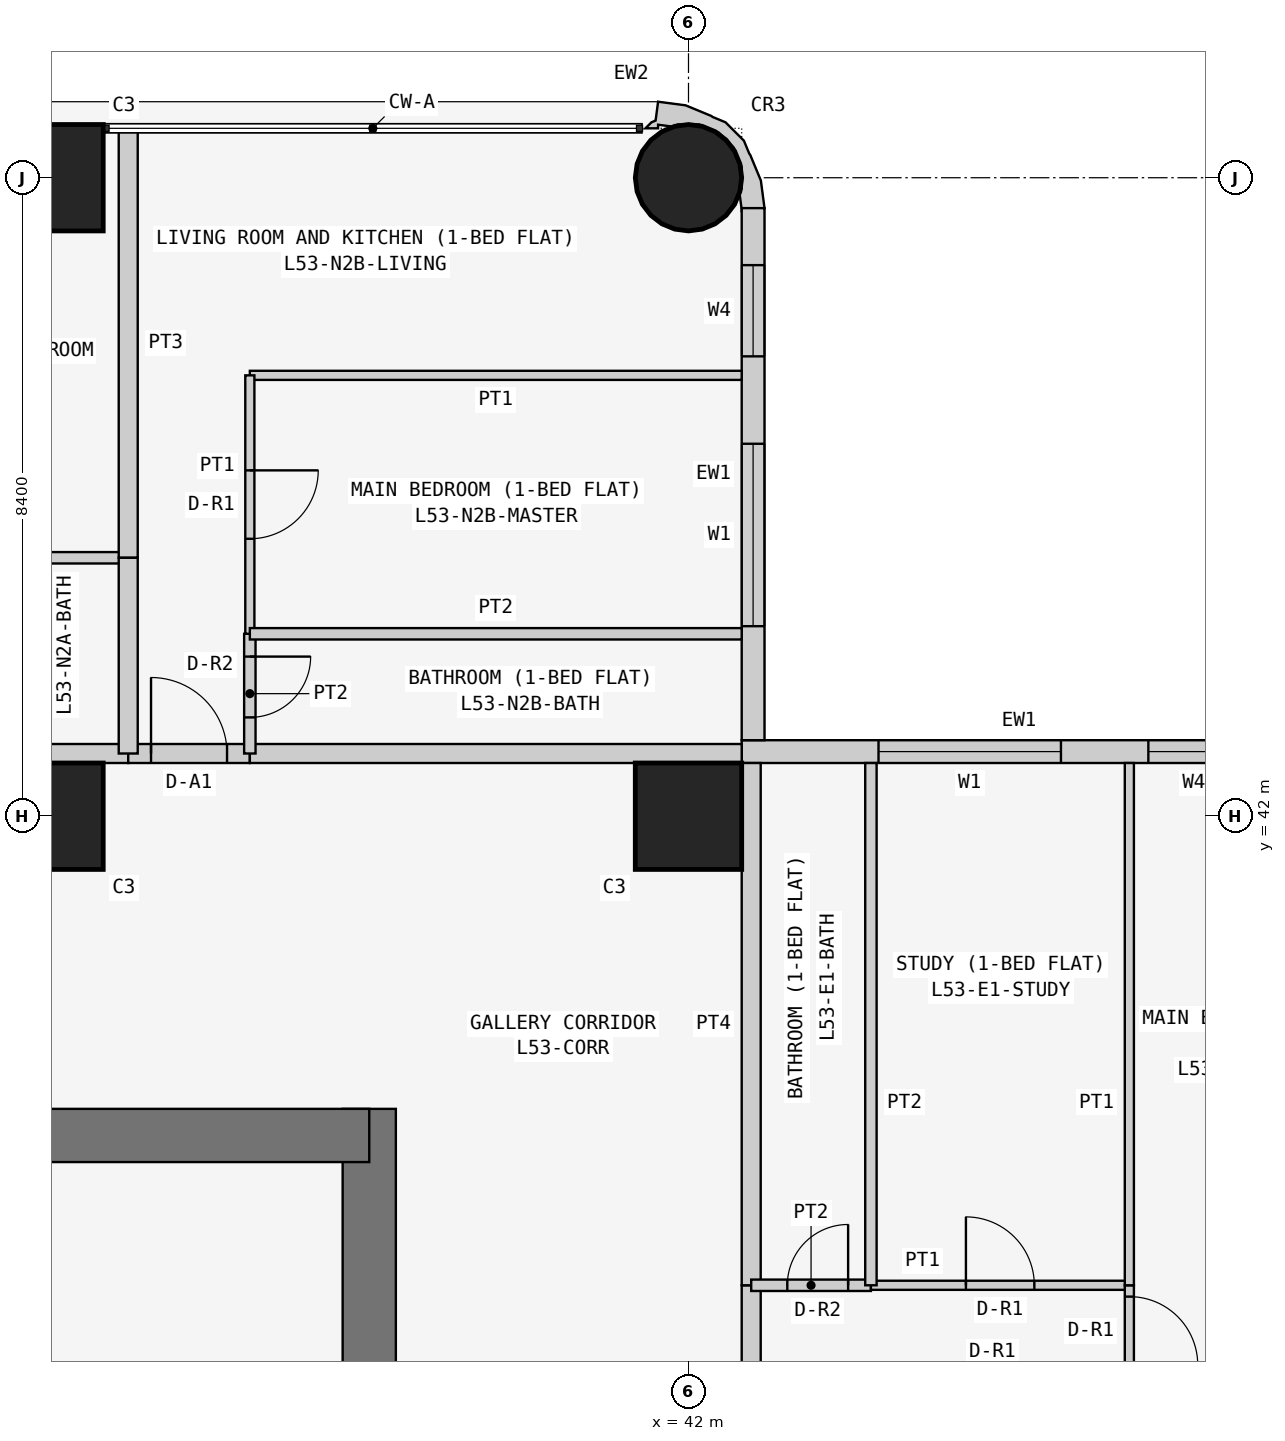
"""IFC4 building model, lengths in metres.
Left out: names, types, materials, properties, quantities, classifications, styles, units other than length and angle.
Written with IfcOpenShell. Run it as: python <this file> out.ifc"""

import sys

from ifc_helpers import new_model, si_unit, direction, frame, frame_2d, origin, origin_2d, place, context, subcontext, project, spatial, polyline, rectangle, circle, outline, extrude, element, fill, save


model = new_model("IFC4")
c1 = context("Model", 3, precision=1e-05, world=origin(), true_north=direction((0.0, 1.0)))
c2 = subcontext(c1, "Body", "Model", "MODEL_VIEW")
j1 = project(units=[si_unit("LENGTHUNIT", "METRE"), si_unit("PLANEANGLEUNIT", "RADIAN")], contexts=[c1])
p1 = place(None, origin())
s1 = spatial("IfcSite", under=j1, at=p1, CompositionType="ELEMENT")
p2 = place(p1, origin())
s2 = spatial("IfcBuilding", under=s1, at=p2, CompositionType="ELEMENT")
p3 = place(p2, frame((0.0, 0.0, 204.9)))
s3 = spatial("IfcBuildingStorey", under=s2, at=p3, CompositionType="ELEMENT", Elevation=204.9)
for number, where, z_axis, x_axis in (
    (1, (33.6, 42.0, 0.0), (0.0, 0.0, 1.0), (1.0, 0.0, 0.0)),
    (2, (33.6, 50.4, 0.0), (0.0, 0.0, 1.0), (1.0, 0.0, 0.0)),
    (3, (42.0, 42.0, 0.0), (0.0, 0.0, 1.0), (1.0, 0.0, 0.0)),
):
    element("IfcColumn", number, at=place(p3, frame(where, z_axis=z_axis, x_axis=x_axis)), inside=s3, PredefinedType="COLUMN", context=c2, shape_type="SweptSolid", body=[
        extrude(rectangle(XDim=1.4, YDim=1.4, at=origin_2d()), origin(), (0.0, 0.0, 1.0), 3.6),
    ])
p4 = place(p3, frame((42.0, 50.4, 0.0), z_axis=(0.0, 0.0, 1.0), x_axis=(1.0, 0.0, 0.0)))
e4 = element("IfcColumn", 4, at=p4, inside=s3, PredefinedType="COLUMN", context=c2, shape_type="SweptSolid", body=[
    extrude(circle(Radius=0.7, at=origin_2d()), origin(), (0.0, 0.0, 1.0), 3.6),
])
p5 = place(p3, frame((37.8, 21.0, 0.0), z_axis=(0.0, 0.0, 1.0), x_axis=(0.0, 1.0, 0.0)))
e5 = element("IfcWall", 5, at=p5, inside=s3, PredefinedType="SHEAR", context=c2, shape_type="SweptSolid", body=[
    extrude(rectangle(XDim=17.15, YDim=0.7, at=frame_2d((8.575, 0.0))), origin(), (0.0, 0.0, 1.0), 3.6),
])
p6 = place(p5, frame((5.2, 0.0, 0.0)))
e6 = element("IfcOpeningElement", 6, at=p6, cuts=e5, PredefinedType="OPENING", context=c2, shape_type="SweptSolid", body=[
    extrude(rectangle(XDim=1.2, YDim=2.1, at=frame_2d((0.6, 1.05))), frame((0.0, 0.36, 0.0), z_axis=(0.0, -1.0, 0.0), x_axis=(1.0, 0.0, 0.0)), (0.0, 0.0, 1.0), 0.72),
])
p7 = place(p3, frame((37.8, 37.8, 0.0), z_axis=(0.0, 0.0, 1.0), x_axis=(-1.0, 0.0, 0.0)))
e7 = element("IfcWall", 7, at=p7, inside=s3, PredefinedType="SHEAR", context=c2, shape_type="SweptSolid", body=[
    extrude(rectangle(XDim=17.15, YDim=0.7, at=frame_2d((8.575, 0.0))), origin(), (0.0, 0.0, 1.0), 3.6),
])
p8 = place(p3, frame((50.0, 42.85, 0.0), z_axis=(0.0, 0.0, 1.0), x_axis=(-1.0, 0.0, 0.0)))
e8 = element("IfcWall", 8, at=p8, inside=s3, PredefinedType="SOLIDWALL", context=c2, shape_type="SweptSolid", body=[
    extrude(rectangle(XDim=7.3, YDim=0.3, at=frame_2d((3.65, 0.0))), origin(), (0.0, 0.0, 1.0), 3.45),
])
p9 = place(p8, frame((3.1, 0.0, 0.9)))
e9 = element("IfcOpeningElement", 9, at=p9, cuts=e8, PredefinedType="OPENING", context=c2, shape_type="SweptSolid", body=[
    extrude(rectangle(XDim=2.4, YDim=1.5, at=frame_2d((1.2, 0.75))), frame((0.0, 0.16, 0.0), z_axis=(0.0, -1.0, 0.0), x_axis=(1.0, 0.0, 0.0)), (0.0, 0.0, 1.0), 0.32),
])
p10 = place(p8, frame((0.75, 0.0, 0.9)))
e10 = element("IfcOpeningElement", 10, at=p10, cuts=e8, PredefinedType="OPENING", context=c2, shape_type="SweptSolid", body=[
    extrude(rectangle(XDim=1.2, YDim=1.5, at=frame_2d((0.6, 0.75))), frame((0.0, 0.16, 0.0), z_axis=(0.0, -1.0, 0.0), x_axis=(1.0, 0.0, 0.0)), (0.0, 0.0, 1.0), 0.32),
])
p11 = place(p3, frame((42.85, 43.0, 0.0), z_axis=(0.0, 0.0, 1.0), x_axis=(0.0, 1.0, 0.0)))
e11 = element("IfcWall", 11, at=p11, inside=s3, PredefinedType="SOLIDWALL", context=c2, shape_type="SweptSolid", body=[
    extrude(rectangle(XDim=7.0, YDim=0.3, at=frame_2d((3.5, 0.0))), origin(), (0.0, 0.0, 1.0), 3.45),
])
p12 = place(p11, frame((1.5, 0.0, 0.9)))
e12 = element("IfcOpeningElement", 12, at=p12, cuts=e11, PredefinedType="OPENING", context=c2, shape_type="SweptSolid", body=[
    extrude(rectangle(XDim=2.4, YDim=1.5, at=frame_2d((1.2, 0.75))), frame((0.0, 0.16, 0.0), z_axis=(0.0, -1.0, 0.0), x_axis=(1.0, 0.0, 0.0)), (0.0, 0.0, 1.0), 0.32),
])
p13 = place(p11, frame((5.05, 0.0, 0.9)))
e13 = element("IfcOpeningElement", 13, at=p13, cuts=e11, PredefinedType="OPENING", context=c2, shape_type="SweptSolid", body=[
    extrude(rectangle(XDim=1.2, YDim=1.5, at=frame_2d((0.6, 0.75))), frame((0.0, 0.16, 0.0), z_axis=(0.0, -1.0, 0.0), x_axis=(1.0, 0.0, 0.0)), (0.0, 0.0, 1.0), 0.32),
])
p14 = place(p3, frame((42.724, 50.11, 0.0), z_axis=(0.0, 0.0, 1.0), x_axis=(0.439933741929, 0.898030234854, 0.0)))
e14 = element("IfcWall", 14, at=p14, inside=s3, PredefinedType="SOLIDWALL", context=c2, shape_type="SweptSolid", body=[
    extrude(outline(polyline([(-0.145, -0.044), (0.022, -0.296), (0.327, -0.094), (0.568, 0.18), (0.577, 0.199), (0.7, 0.337), (0.811, 0.661), (0.799, 0.845), (0.803, 0.866), (0.78, 1.231), (0.664, 1.577), (0.426, 1.497), (0.382, 1.536), (0.276, 1.572), (0.349, 1.423), (0.392, 1.444), (0.453, 1.261), (0.51, 1.211), (0.632, 0.961), (0.65, 0.683), (0.56, 0.419), (0.375, 0.21), (0.125, 0.087), (0.05, 0.082), (-0.127, -0.035), (-0.145, -0.044)])), origin(), (0.0, 0.0, 1.0), 3.45),
])
p15 = place(p3, frame((32.0, 42.825, 0.0), z_axis=(0.0, 0.0, 1.0), x_axis=(1.0, 0.0, 0.0)))
e15 = element("IfcWall", 15, at=p15, inside=s3, PredefinedType="PARTITIONING", context=c2, shape_type="SweptSolid", body=[
    extrude(rectangle(XDim=2.629, YDim=0.25, at=frame_2d((1.314, 0.0))), origin(), (0.0, 0.0, 1.0), 3.45),
])
p16 = place(p3, frame((34.629, 42.825, 0.0), z_axis=(0.0, 0.0, 1.0), x_axis=(1.0, 0.0, 0.0)))
e16 = element("IfcWall", 16, at=p16, inside=s3, PredefinedType="PARTITIONING", context=c2, shape_type="SweptSolid", body=[
    extrude(rectangle(XDim=1.6, YDim=0.25, at=frame_2d((0.8, 0.0))), origin(), (0.0, 0.0, 1.0), 3.45),
])
p17 = place(p16, frame((0.3, 0.0, 0.0)))
e17 = element("IfcOpeningElement", 17, at=p17, cuts=e16, PredefinedType="OPENING", context=c2, shape_type="SweptSolid", body=[
    extrude(rectangle(XDim=1.0, YDim=2.1, at=frame_2d((0.5, 1.05))), frame((0.0, 0.135, 0.0), z_axis=(0.0, -1.0, 0.0), x_axis=(1.0, 0.0, 0.0)), (0.0, 0.0, 1.0), 0.27),
])
p18 = place(p3, frame((36.229, 42.825, 0.0), z_axis=(0.0, 0.0, 1.0), x_axis=(1.0, 0.0, 0.0)))
e18 = element("IfcWall", 18, at=p18, inside=s3, PredefinedType="PARTITIONING", context=c2, shape_type="SweptSolid", body=[
    extrude(rectangle(XDim=6.471, YDim=0.25, at=frame_2d((3.235, 0.0))), origin(), (0.0, 0.0, 1.0), 3.45),
])
p19 = place(p3, frame((42.825, 35.829, 0.0), z_axis=(0.0, 0.0, 1.0), x_axis=(0.0, -1.0, 0.0)))
e19 = element("IfcWall", 19, at=p19, inside=s3, PredefinedType="PARTITIONING", context=c2, shape_type="SweptSolid", body=[
    extrude(rectangle(XDim=6.429, YDim=0.25, at=frame_2d((3.215, 0.0))), origin(), (0.0, 0.0, 1.0), 3.45),
])
p20 = place(p19, frame((4.929, 0.0, 0.0)))
e20 = element("IfcOpeningElement", 20, at=p20, cuts=e19, PredefinedType="OPENING", context=c2, shape_type="SweptSolid", body=[
    extrude(rectangle(XDim=1.0, YDim=2.1, at=frame_2d((0.5, 1.05))), frame((0.0, 0.135, 0.0), z_axis=(0.0, -1.0, 0.0), x_axis=(1.0, 0.0, 0.0)), (0.0, 0.0, 1.0), 0.27),
])
p21 = place(p3, frame((42.825, 42.7, 0.0), z_axis=(0.0, 0.0, 1.0), x_axis=(0.0, -1.0, 0.0)))
e21 = element("IfcWall", 21, at=p21, inside=s3, PredefinedType="PARTITIONING", context=c2, shape_type="SweptSolid", body=[
    extrude(rectangle(XDim=6.871, YDim=0.25, at=frame_2d((3.436, 0.0))), origin(), (0.0, 0.0, 1.0), 3.45),
])
p22 = place(p3, frame((34.629, 45.4, 0.0), z_axis=(0.0, 0.0, 1.0), x_axis=(-1.0, 0.0, 0.0)))
e22 = element("IfcWall", 22, at=p22, inside=s3, PredefinedType="PARTITIONING", context=c2, shape_type="SweptSolid", body=[
    extrude(rectangle(XDim=2.629, YDim=0.15, at=frame_2d((1.314, 0.0))), origin(), (0.0, 0.0, 1.0), 3.45),
])
p23 = place(p3, frame((34.629, 51.05, 0.0), z_axis=(0.0, 0.0, 1.0), x_axis=(0.0, -1.0, 0.0)))
e23 = element("IfcWall", 23, at=p23, inside=s3, PredefinedType="PARTITIONING", context=c2, shape_type="SweptSolid", body=[
    extrude(rectangle(XDim=5.65, YDim=0.25, at=frame_2d((2.825, 0.0))), origin(), (0.0, 0.0, 1.0), 3.45),
])
p24 = place(p3, frame((34.629, 45.4, 0.0), z_axis=(0.0, 0.0, 1.0), x_axis=(0.0, -1.0, 0.0)))
e24 = element("IfcWall", 24, at=p24, inside=s3, PredefinedType="PARTITIONING", context=c2, shape_type="SweptSolid", body=[
    extrude(rectangle(XDim=2.575, YDim=0.25, at=frame_2d((1.288, 0.0))), origin(), (0.0, 0.0, 1.0), 3.45),
])
p25 = place(p3, frame((36.229, 44.4, 0.0), z_axis=(0.0, 0.0, 1.0), x_axis=(0.0, -1.0, 0.0)))
e25 = element("IfcWall", 25, at=p25, inside=s3, PredefinedType="PARTITIONING", context=c2, shape_type="SweptSolid", body=[
    extrude(rectangle(XDim=1.575, YDim=0.15, at=frame_2d((0.788, 0.0))), origin(), (0.0, 0.0, 1.0), 3.45),
])
p26 = place(p25, frame((0.3, 0.0, 0.0)))
e26 = element("IfcOpeningElement", 26, at=p26, cuts=e25, PredefinedType="OPENING", context=c2, shape_type="SweptSolid", body=[
    extrude(rectangle(XDim=0.8, YDim=2.1, at=frame_2d((0.4, 1.05))), frame((0.0, 0.085, 0.0), z_axis=(0.0, -1.0, 0.0), x_axis=(1.0, 0.0, 0.0)), (0.0, 0.0, 1.0), 0.17),
])
p27 = place(p3, frame((42.7, 47.8, 0.0), z_axis=(0.0, 0.0, 1.0), x_axis=(-1.0, 0.0, 0.0)))
e27 = element("IfcWall", 27, at=p27, inside=s3, PredefinedType="PARTITIONING", context=c2, shape_type="SweptSolid", body=[
    extrude(rectangle(XDim=6.471, YDim=0.12, at=frame_2d((3.235, 0.0))), origin(), (0.0, 0.0, 1.0), 3.45),
])
p28 = place(p3, frame((36.229, 47.8, 0.0), z_axis=(0.0, 0.0, 1.0), x_axis=(0.0, -1.0, 0.0)))
e28 = element("IfcWall", 28, at=p28, inside=s3, PredefinedType="PARTITIONING", context=c2, shape_type="SweptSolid", body=[
    extrude(rectangle(XDim=3.4, YDim=0.12, at=frame_2d((1.7, 0.0))), origin(), (0.0, 0.0, 1.0), 3.45),
])
p29 = place(p28, frame((1.25, 0.0, 0.0)))
e29 = element("IfcOpeningElement", 29, at=p29, cuts=e28, PredefinedType="OPENING", context=c2, shape_type="SweptSolid", body=[
    extrude(rectangle(XDim=0.9, YDim=2.1, at=frame_2d((0.45, 1.05))), frame((0.0, 0.07, 0.0), z_axis=(0.0, -1.0, 0.0), x_axis=(1.0, 0.0, 0.0)), (0.0, 0.0, 1.0), 0.14),
])
p30 = place(p3, frame((36.229, 44.4, 0.0), z_axis=(0.0, 0.0, 1.0), x_axis=(1.0, 0.0, 0.0)))
e30 = element("IfcWall", 30, at=p30, inside=s3, PredefinedType="PARTITIONING", context=c2, shape_type="SweptSolid", body=[
    extrude(rectangle(XDim=6.471, YDim=0.15, at=frame_2d((3.235, 0.0))), origin(), (0.0, 0.0, 1.0), 3.45),
])
p31 = place(p3, frame((42.825, 35.829, 0.0), z_axis=(0.0, 0.0, 1.0), x_axis=(1.0, 0.0, 0.0)))
e31 = element("IfcWall", 31, at=p31, inside=s3, PredefinedType="PARTITIONING", context=c2, shape_type="SweptSolid", body=[
    extrude(rectangle(XDim=1.575, YDim=0.15, at=frame_2d((0.788, 0.0))), origin(), (0.0, 0.0, 1.0), 3.45),
])
p32 = place(p31, frame((0.475, 0.0, 0.0)))
e32 = element("IfcOpeningElement", 32, at=p32, cuts=e31, PredefinedType="OPENING", context=c2, shape_type="SweptSolid", body=[
    extrude(rectangle(XDim=0.8, YDim=2.1, at=frame_2d((0.4, 1.05))), frame((0.0, 0.085, 0.0), z_axis=(0.0, -1.0, 0.0), x_axis=(1.0, 0.0, 0.0)), (0.0, 0.0, 1.0), 0.17),
])
p33 = place(p3, frame((44.4, 35.829, 0.0), z_axis=(0.0, 0.0, 1.0), x_axis=(1.0, 0.0, 0.0)))
e33 = element("IfcWall", 33, at=p33, inside=s3, PredefinedType="PARTITIONING", context=c2, shape_type="SweptSolid", body=[
    extrude(rectangle(XDim=3.4, YDim=0.12, at=frame_2d((1.7, 0.0))), origin(), (0.0, 0.0, 1.0), 3.45),
])
p34 = place(p33, frame((1.25, 0.0, 0.0)))
e34 = element("IfcOpeningElement", 34, at=p34, cuts=e33, PredefinedType="OPENING", context=c2, shape_type="SweptSolid", body=[
    extrude(rectangle(XDim=0.9, YDim=2.1, at=frame_2d((0.45, 1.05))), frame((0.0, 0.07, 0.0), z_axis=(0.0, -1.0, 0.0), x_axis=(1.0, 0.0, 0.0)), (0.0, 0.0, 1.0), 0.14),
])
p35 = place(p3, frame((47.8, 35.829, 0.0), z_axis=(0.0, 0.0, 1.0), x_axis=(0.0, -1.0, 0.0)))
e35 = element("IfcWall", 35, at=p35, inside=s3, PredefinedType="PARTITIONING", context=c2, shape_type="SweptSolid", body=[
    extrude(rectangle(XDim=1.2, YDim=0.12, at=frame_2d((0.6, 0.0))), origin(), (0.0, 0.0, 1.0), 3.45),
])
p36 = place(p35, frame((0.149, 0.0, 0.0)))
e36 = element("IfcOpeningElement", 36, at=p36, cuts=e35, PredefinedType="OPENING", context=c2, shape_type="SweptSolid", body=[
    extrude(rectangle(XDim=0.9, YDim=2.1, at=frame_2d((0.45, 1.05))), frame((0.0, 0.07, 0.0), z_axis=(0.0, -1.0, 0.0), x_axis=(1.0, 0.0, 0.0)), (0.0, 0.0, 1.0), 0.14),
])
p37 = place(p3, frame((44.4, 35.829, 0.0), z_axis=(0.0, 0.0, 1.0), x_axis=(0.0, 1.0, 0.0)))
e37 = element("IfcWall", 37, at=p37, inside=s3, PredefinedType="PARTITIONING", context=c2, shape_type="SweptSolid", body=[
    extrude(rectangle(XDim=6.871, YDim=0.15, at=frame_2d((3.436, 0.0))), origin(), (0.0, 0.0, 1.0), 3.45),
])
p38 = place(p3, frame((47.8, 35.829, 0.0), z_axis=(0.0, 0.0, 1.0), x_axis=(0.0, 1.0, 0.0)))
e38 = element("IfcWall", 38, at=p38, inside=s3, PredefinedType="PARTITIONING", context=c2, shape_type="SweptSolid", body=[
    extrude(rectangle(XDim=6.871, YDim=0.12, at=frame_2d((3.436, 0.0))), origin(), (0.0, 0.0, 1.0), 3.45),
])
p39 = place(p12, origin())
e39 = element("IfcWindow", 39, at=p39, inside=s3, PartitioningType="SINGLE_PANEL", PredefinedType="WINDOW", context=c2, shape_type="SweptSolid", body=[
    extrude(rectangle(XDim=2.4, YDim=1.5, at=frame_2d((1.2, 0.75))), frame((0.0, 0.03, 0.0), z_axis=(0.0, -1.0, 0.0), x_axis=(1.0, 0.0, 0.0)), (0.0, 0.0, 1.0), 0.06),
])
fill(e12, e39)
p40 = place(p13, origin())
e40 = element("IfcWindow", 40, at=p40, inside=s3, PartitioningType="SINGLE_PANEL", PredefinedType="WINDOW", context=c2, shape_type="SweptSolid", body=[
    extrude(rectangle(XDim=1.2, YDim=1.5, at=frame_2d((0.6, 0.75))), frame((0.0, 0.03, 0.0), z_axis=(0.0, -1.0, 0.0), x_axis=(1.0, 0.0, 0.0)), (0.0, 0.0, 1.0), 0.06),
])
fill(e13, e40)
p41 = place(p9, origin())
e41 = element("IfcWindow", 41, at=p41, inside=s3, PartitioningType="SINGLE_PANEL", PredefinedType="WINDOW", context=c2, shape_type="SweptSolid", body=[
    extrude(rectangle(XDim=2.4, YDim=1.5, at=frame_2d((1.2, 0.75))), frame((0.0, 0.03, 0.0), z_axis=(0.0, -1.0, 0.0), x_axis=(1.0, 0.0, 0.0)), (0.0, 0.0, 1.0), 0.06),
])
fill(e9, e41)
p42 = place(p10, origin())
e42 = element("IfcWindow", 42, at=p42, inside=s3, PartitioningType="SINGLE_PANEL", PredefinedType="WINDOW", context=c2, shape_type="SweptSolid", body=[
    extrude(rectangle(XDim=1.2, YDim=1.5, at=frame_2d((0.6, 0.75))), frame((0.0, 0.03, 0.0), z_axis=(0.0, -1.0, 0.0), x_axis=(1.0, 0.0, 0.0)), (0.0, 0.0, 1.0), 0.06),
])
fill(e10, e42)
p43 = place(p17, origin())
e43 = element("IfcDoor", 43, at=p43, inside=s3, OperationType="SINGLE_SWING_LEFT", PredefinedType="DOOR", context=c2, shape_type="SweptSolid", body=[
    extrude(rectangle(XDim=1.0, YDim=2.1, at=frame_2d((0.5, 1.05))), frame((0.0, 0.025, 0.0), z_axis=(0.0, -1.0, 0.0), x_axis=(1.0, 0.0, 0.0)), (0.0, 0.0, 1.0), 0.05),
])
fill(e17, e43)
p44 = place(p26, origin())
e44 = element("IfcDoor", 44, at=p44, inside=s3, OperationType="SINGLE_SWING_LEFT", PredefinedType="DOOR", context=c2, shape_type="SweptSolid", body=[
    extrude(rectangle(XDim=0.8, YDim=2.1, at=frame_2d((0.4, 1.05))), frame((0.0, 0.025, 0.0), z_axis=(0.0, -1.0, 0.0), x_axis=(1.0, 0.0, 0.0)), (0.0, 0.0, 1.0), 0.05),
])
fill(e26, e44)
p45 = place(p29, origin())
e45 = element("IfcDoor", 45, at=p45, inside=s3, OperationType="SINGLE_SWING_LEFT", PredefinedType="DOOR", context=c2, shape_type="SweptSolid", body=[
    extrude(rectangle(XDim=0.9, YDim=2.1, at=frame_2d((0.45, 1.05))), frame((0.0, 0.025, 0.0), z_axis=(0.0, -1.0, 0.0), x_axis=(1.0, 0.0, 0.0)), (0.0, 0.0, 1.0), 0.05),
])
fill(e29, e45)
p46 = place(p32, origin())
e46 = element("IfcDoor", 46, at=p46, inside=s3, OperationType="SINGLE_SWING_RIGHT", PredefinedType="DOOR", context=c2, shape_type="SweptSolid", body=[
    extrude(rectangle(XDim=0.8, YDim=2.1, at=frame_2d((0.4, 1.05))), frame((0.0, 0.025, 0.0), z_axis=(0.0, -1.0, 0.0), x_axis=(1.0, 0.0, 0.0)), (0.0, 0.0, 1.0), 0.05),
])
fill(e32, e46)
p47 = place(p34, origin())
e47 = element("IfcDoor", 47, at=p47, inside=s3, OperationType="SINGLE_SWING_LEFT", PredefinedType="DOOR", context=c2, shape_type="SweptSolid", body=[
    extrude(rectangle(XDim=0.9, YDim=2.1, at=frame_2d((0.45, 1.05))), frame((0.0, 0.025, 0.0), z_axis=(0.0, -1.0, 0.0), x_axis=(1.0, 0.0, 0.0)), (0.0, 0.0, 1.0), 0.05),
])
fill(e34, e47)
p48 = place(p36, origin())
e48 = element("IfcDoor", 48, at=p48, inside=s3, OperationType="SINGLE_SWING_RIGHT", PredefinedType="DOOR", context=c2, shape_type="SweptSolid", body=[
    extrude(rectangle(XDim=0.9, YDim=2.1, at=frame_2d((0.45, 1.05))), frame((0.0, 0.025, 0.0), z_axis=(0.0, -1.0, 0.0), x_axis=(1.0, 0.0, 0.0)), (0.0, 0.0, 1.0), 0.05),
])
fill(e36, e48)
save(model, sys.argv[1])
